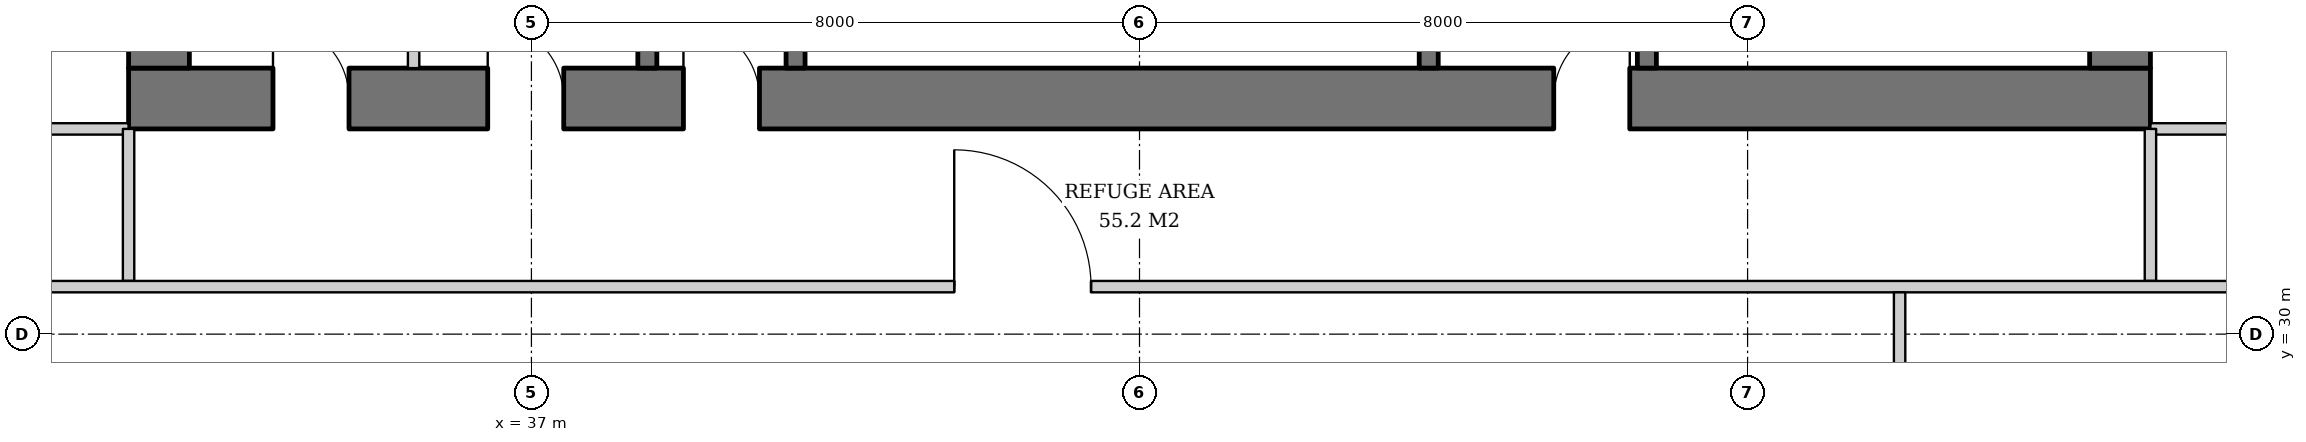
"""IFC4 building model, lengths in metres.
Left out: names, types, materials, properties, quantities, classifications, styles, units other than length and angle.
Written with IfcOpenShell. Run it as: python <this file> out.ifc"""

import sys

from ifc_helpers import new_model, si_unit, direction, frame, frame_2d, origin, place, context, subcontext, project, spatial, rectangle, extrude, element, fill, save


model = new_model("IFC4")
c1 = context("Model", 3, precision=1e-05, world=origin(), true_north=direction((0.0, 1.0)))
c2 = subcontext(c1, "Body", "Model", "MODEL_VIEW")
j1 = project(units=[si_unit("LENGTHUNIT", "METRE"), si_unit("PLANEANGLEUNIT", "RADIAN")], contexts=[c1])
p1 = place(None, origin())
s1 = spatial("IfcSite", under=j1, at=p1, CompositionType="ELEMENT")
p2 = place(p1, origin())
s2 = spatial("IfcBuilding", under=s1, at=p2, CompositionType="ELEMENT")
p3 = place(p2, frame((0.0, 0.0, 85.6)))
s3 = spatial("IfcBuildingStorey", under=s2, at=p3, CompositionType="ELEMENT", Elevation=85.6)
p4 = place(p3, frame((31.7, 33.1, 0.0), z_axis=(0.0, 0.0, 1.0), x_axis=(1.0, 0.0, 0.0)))
e1 = element("IfcWall", 1, at=p4, inside=s3, PredefinedType="SHEAR", context=c2, shape_type="SweptSolid", body=[
    extrude(rectangle(XDim=26.6, YDim=0.8, at=frame_2d((13.3, 0.0))), origin(), (0.0, 0.0, 1.0), 3.8),
])
p5 = place(p4, frame((7.3, 0.0, 0.0)))
e2 = element("IfcOpeningElement", 2, at=p5, cuts=e1, PredefinedType="OPENING", context=c2, shape_type="SweptSolid", body=[
    extrude(rectangle(XDim=1.0, YDim=2.1, at=frame_2d((0.5, 1.05))), frame((0.0, 0.41, 0.0), z_axis=(0.0, -1.0, 0.0), x_axis=(1.0, 0.0, 0.0)), (0.0, 0.0, 1.0), 0.82),
])
p6 = place(p4, frame((18.75, 0.0, 0.0)))
e3 = element("IfcOpeningElement", 3, at=p6, cuts=e1, PredefinedType="OPENING", context=c2, shape_type="SweptSolid", body=[
    extrude(rectangle(XDim=1.0, YDim=2.1, at=frame_2d((0.5, 1.05))), frame((0.0, 0.41, 0.0), z_axis=(0.0, -1.0, 0.0), x_axis=(1.0, 0.0, 0.0)), (0.0, 0.0, 1.0), 0.82),
])
p7 = place(p4, frame((1.9, 0.0, 0.0)))
e4 = element("IfcOpeningElement", 4, at=p7, cuts=e1, PredefinedType="OPENING", context=c2, shape_type="SweptSolid", body=[
    extrude(rectangle(XDim=1.0, YDim=2.1, at=frame_2d((0.5, 1.05))), frame((0.0, 0.41, 0.0), z_axis=(0.0, -1.0, 0.0), x_axis=(1.0, 0.0, 0.0)), (0.0, 0.0, 1.0), 0.82),
])
p8 = place(p4, frame((4.725, 0.0, 0.0)))
e5 = element("IfcOpeningElement", 5, at=p8, cuts=e1, PredefinedType="OPENING", context=c2, shape_type="SweptSolid", body=[
    extrude(rectangle(XDim=1.0, YDim=2.1, at=frame_2d((0.5, 1.05))), frame((0.0, 0.41, 0.0), z_axis=(0.0, -1.0, 0.0), x_axis=(1.0, 0.0, 0.0)), (0.0, 0.0, 1.0), 0.82),
])
p9 = place(p3, frame((32.1, 33.5, 0.0), z_axis=(0.0, 0.0, 1.0), x_axis=(0.0, 1.0, 0.0)))
e6 = element("IfcWall", 6, at=p9, inside=s3, PredefinedType="SHEAR", context=c2, shape_type="SweptSolid", body=[
    extrude(rectangle(XDim=25.0, YDim=0.8, at=frame_2d((12.5, 0.0))), origin(), (0.0, 0.0, 1.0), 3.8),
])
p10 = place(p9, frame((11.6, 0.0, 0.0)))
e7 = element("IfcOpeningElement", 7, at=p10, cuts=e6, PredefinedType="OPENING", context=c2, shape_type="SweptSolid", body=[
    extrude(rectangle(XDim=1.8, YDim=2.4, at=frame_2d((0.9, 1.2))), frame((0.0, 0.41, 0.0), z_axis=(0.0, -1.0, 0.0), x_axis=(1.0, 0.0, 0.0)), (0.0, 0.0, 1.0), 0.82),
])
p11 = place(p3, frame((57.9, 33.5, 0.0), z_axis=(0.0, 0.0, 1.0), x_axis=(0.0, 1.0, 0.0)))
e8 = element("IfcWall", 8, at=p11, inside=s3, PredefinedType="SHEAR", context=c2, shape_type="SweptSolid", body=[
    extrude(rectangle(XDim=25.0, YDim=0.8, at=frame_2d((12.5, 0.0))), origin(), (0.0, 0.0, 1.0), 3.8),
])
p12 = place(p11, frame((11.6, 0.0, 0.0)))
e9 = element("IfcOpeningElement", 9, at=p12, cuts=e8, PredefinedType="OPENING", context=c2, shape_type="SweptSolid", body=[
    extrude(rectangle(XDim=1.8, YDim=2.4, at=frame_2d((0.9, 1.2))), frame((0.0, 0.41, 0.0), z_axis=(0.0, -1.0, 0.0), x_axis=(1.0, 0.0, 0.0)), (0.0, 0.0, 1.0), 0.82),
])
p13 = place(p3, frame((38.525, 33.5, 0.0), z_axis=(0.0, 0.0, 1.0), x_axis=(0.0, 1.0, 0.0)))
e10 = element("IfcWall", 10, at=p13, inside=s3, PredefinedType="SOLIDWALL", context=c2, shape_type="SweptSolid", body=[
    extrude(rectangle(XDim=2.6, YDim=0.25, at=frame_2d((1.3, 0.0))), origin(), (0.0, 0.0, 1.0), 3.6),
])
p14 = place(p3, frame((40.475, 33.5, 0.0), z_axis=(0.0, 0.0, 1.0), x_axis=(0.0, 1.0, 0.0)))
e11 = element("IfcWall", 11, at=p14, inside=s3, PredefinedType="SOLIDWALL", context=c2, shape_type="SweptSolid", body=[
    extrude(rectangle(XDim=2.6, YDim=0.25, at=frame_2d((1.3, 0.0))), origin(), (0.0, 0.0, 1.0), 3.6),
])
p15 = place(p14, frame((0.8, 0.0, 0.0)))
e12 = element("IfcOpeningElement", 12, at=p15, cuts=e11, PredefinedType="OPENING", context=c2, shape_type="SweptSolid", body=[
    extrude(rectangle(XDim=1.0, YDim=2.1, at=frame_2d((0.5, 1.05))), frame((0.0, 0.135, 0.0), z_axis=(0.0, -1.0, 0.0), x_axis=(1.0, 0.0, 0.0)), (0.0, 0.0, 1.0), 0.27),
])
p16 = place(p3, frame((48.805, 33.5, 0.0), z_axis=(0.0, 0.0, 1.0), x_axis=(0.0, 1.0, 0.0)))
e13 = element("IfcWall", 13, at=p16, inside=s3, PredefinedType="SOLIDWALL", context=c2, shape_type="SweptSolid", body=[
    extrude(rectangle(XDim=2.6, YDim=0.25, at=frame_2d((1.3, 0.0))), origin(), (0.0, 0.0, 1.0), 3.6),
])
p17 = place(p16, frame((0.8, 0.0, 0.0)))
e14 = element("IfcOpeningElement", 14, at=p17, cuts=e13, PredefinedType="OPENING", context=c2, shape_type="SweptSolid", body=[
    extrude(rectangle(XDim=1.0, YDim=2.1, at=frame_2d((0.5, 1.05))), frame((0.0, 0.135, 0.0), z_axis=(0.0, -1.0, 0.0), x_axis=(1.0, 0.0, 0.0)), (0.0, 0.0, 1.0), 0.27),
])
p18 = place(p3, frame((51.675, 33.5, 0.0), z_axis=(0.0, 0.0, 1.0), x_axis=(0.0, 1.0, 0.0)))
e15 = element("IfcWall", 15, at=p18, inside=s3, PredefinedType="SOLIDWALL", context=c2, shape_type="SweptSolid", body=[
    extrude(rectangle(XDim=2.6, YDim=0.25, at=frame_2d((1.3, 0.0))), origin(), (0.0, 0.0, 1.0), 3.6),
])
p19 = place(p18, frame((0.8, 0.0, 0.0)))
e16 = element("IfcOpeningElement", 16, at=p19, cuts=e15, PredefinedType="OPENING", context=c2, shape_type="SweptSolid", body=[
    extrude(rectangle(XDim=1.0, YDim=2.1, at=frame_2d((0.5, 1.05))), frame((0.0, 0.135, 0.0), z_axis=(0.0, -1.0, 0.0), x_axis=(1.0, 0.0, 0.0)), (0.0, 0.0, 1.0), 0.27),
])
p20 = place(p3, frame((35.45, 33.5, 0.0), z_axis=(0.0, 0.0, 1.0), x_axis=(0.0, 1.0, 0.0)))
e17 = element("IfcWall", 17, at=p20, inside=s3, PredefinedType="SOLIDWALL", context=c2, shape_type="SweptSolid", body=[
    extrude(rectangle(XDim=2.6, YDim=0.15, at=frame_2d((1.3, 0.0))), origin(), (0.0, 0.0, 1.0), 3.6),
])
p21 = place(p3, frame((58.3, 32.7, 0.0), z_axis=(0.0, 0.0, 1.0), x_axis=(1.0, 0.0, 0.0)))
e18 = element("IfcWall", 18, at=p21, inside=s3, PredefinedType="PARTITIONING", context=c2, shape_type="SweptSolid", body=[
    extrude(rectangle(XDim=2.0, YDim=0.15, at=frame_2d((1.0, 0.0))), origin(), (0.0, 0.0, 1.0), 2.592),
])
for number, where, z_axis, x_axis in (
    (19, (31.7, 32.7, 0.0), (0.0, 0.0, 1.0), (-1.0, 0.0, 0.0)),
    (20, (58.3, 32.7, 0.0), (0.0, 0.0, 1.0), (0.0, -1.0, 0.0)),
):
    element("IfcWall", number, at=place(p3, frame(where, z_axis=z_axis, x_axis=x_axis)), inside=s3, PredefinedType="PARTITIONING", context=c2, shape_type="SweptSolid", body=[
        extrude(rectangle(XDim=2.0, YDim=0.15, at=frame_2d((1.0, 0.0))), origin(), (0.0, 0.0, 1.0), 3.6),
    ])
p22 = place(p3, frame((31.7, 32.7, 0.0), z_axis=(0.0, 0.0, 1.0), x_axis=(0.0, -1.0, 0.0)))
e21 = element("IfcWall", 21, at=p22, inside=s3, PredefinedType="PARTITIONING", context=c2, shape_type="SweptSolid", body=[
    extrude(rectangle(XDim=2.0, YDim=0.15, at=frame_2d((1.0, 0.0))), origin(), (0.0, 0.0, 1.0), 2.592),
])
p23 = place(p3, frame((29.55, 30.625, 0.0), z_axis=(0.0, 0.0, 1.0), x_axis=(1.0, 0.0, 0.0)))
e22 = element("IfcWall", 22, at=p23, inside=s3, PredefinedType="PARTITIONING", context=c2, shape_type="SweptSolid", body=[
    extrude(rectangle(XDim=30.75, YDim=0.15, at=frame_2d((15.375, 0.0))), origin(), (0.0, 0.0, 1.0), 2.592),
])
p24 = place(p23, frame((13.012, 0.0, 0.0)))
e23 = element("IfcOpeningElement", 23, at=p24, cuts=e22, PredefinedType="OPENING", context=c2, shape_type="SweptSolid", body=[
    extrude(rectangle(XDim=1.8, YDim=2.4, at=frame_2d((0.9, 1.2))), frame((0.0, 0.085, 0.0), z_axis=(0.0, -1.0, 0.0), x_axis=(1.0, 0.0, 0.0)), (0.0, 0.0, 1.0), 0.17),
])
p25 = place(p3, frame((55.0, 30.55, 0.0), z_axis=(0.0, 0.0, 1.0), x_axis=(0.0, -1.0, 0.0)))
e24 = element("IfcWall", 24, at=p25, inside=s3, PredefinedType="PARTITIONING", context=c2, shape_type="SweptSolid", body=[
    extrude(rectangle(XDim=5.798, YDim=0.15, at=frame_2d((2.899, 0.0))), origin(), (0.0, 0.0, 1.0), 3.6),
])
p26 = place(p5, origin())
e25 = element("IfcDoor", 25, at=p26, inside=s3, OperationType="SINGLE_SWING_LEFT", PredefinedType="DOOR", context=c2, shape_type="SweptSolid", body=[
    extrude(rectangle(XDim=1.0, YDim=2.1, at=frame_2d((0.5, 1.05))), frame((0.0, 0.025, 0.0), z_axis=(0.0, -1.0, 0.0), x_axis=(1.0, 0.0, 0.0)), (0.0, 0.0, 1.0), 0.05),
])
fill(e2, e25)
p27 = place(p6, origin())
e26 = element("IfcDoor", 26, at=p27, inside=s3, OperationType="SINGLE_SWING_RIGHT", PredefinedType="DOOR", context=c2, shape_type="SweptSolid", body=[
    extrude(rectangle(XDim=1.0, YDim=2.1, at=frame_2d((0.5, 1.05))), frame((0.0, 0.025, 0.0), z_axis=(0.0, -1.0, 0.0), x_axis=(1.0, 0.0, 0.0)), (0.0, 0.0, 1.0), 0.05),
])
fill(e3, e26)
p28 = place(p7, origin())
e27 = element("IfcDoor", 27, at=p28, inside=s3, OperationType="SINGLE_SWING_LEFT", PredefinedType="DOOR", context=c2, shape_type="SweptSolid", body=[
    extrude(rectangle(XDim=1.0, YDim=2.1, at=frame_2d((0.5, 1.05))), frame((0.0, 0.39, 0.0), z_axis=(0.0, -1.0, 0.0), x_axis=(1.0, 0.0, 0.0)), (0.0, 0.0, 1.0), 0.05),
])
fill(e4, e27)
p29 = place(p8, origin())
e28 = element("IfcDoor", 28, at=p29, inside=s3, OperationType="SINGLE_SWING_LEFT", PredefinedType="DOOR", context=c2, shape_type="SweptSolid", body=[
    extrude(rectangle(XDim=1.0, YDim=2.1, at=frame_2d((0.5, 1.05))), frame((0.0, 0.39, 0.0), z_axis=(0.0, -1.0, 0.0), x_axis=(1.0, 0.0, 0.0)), (0.0, 0.0, 1.0), 0.05),
])
fill(e5, e28)
p30 = place(p24, origin())
e29 = element("IfcDoor", 29, at=p30, inside=s3, OperationType="DOUBLE_DOOR_SINGLE_SWING", PredefinedType="DOOR", context=c2, shape_type="SweptSolid", body=[
    extrude(rectangle(XDim=1.8, YDim=2.4, at=frame_2d((0.9, 1.2))), frame((0.0, 0.025, 0.0), z_axis=(0.0, -1.0, 0.0), x_axis=(1.0, 0.0, 0.0)), (0.0, 0.0, 1.0), 0.05),
])
fill(e23, e29)
save(model, sys.argv[1])
